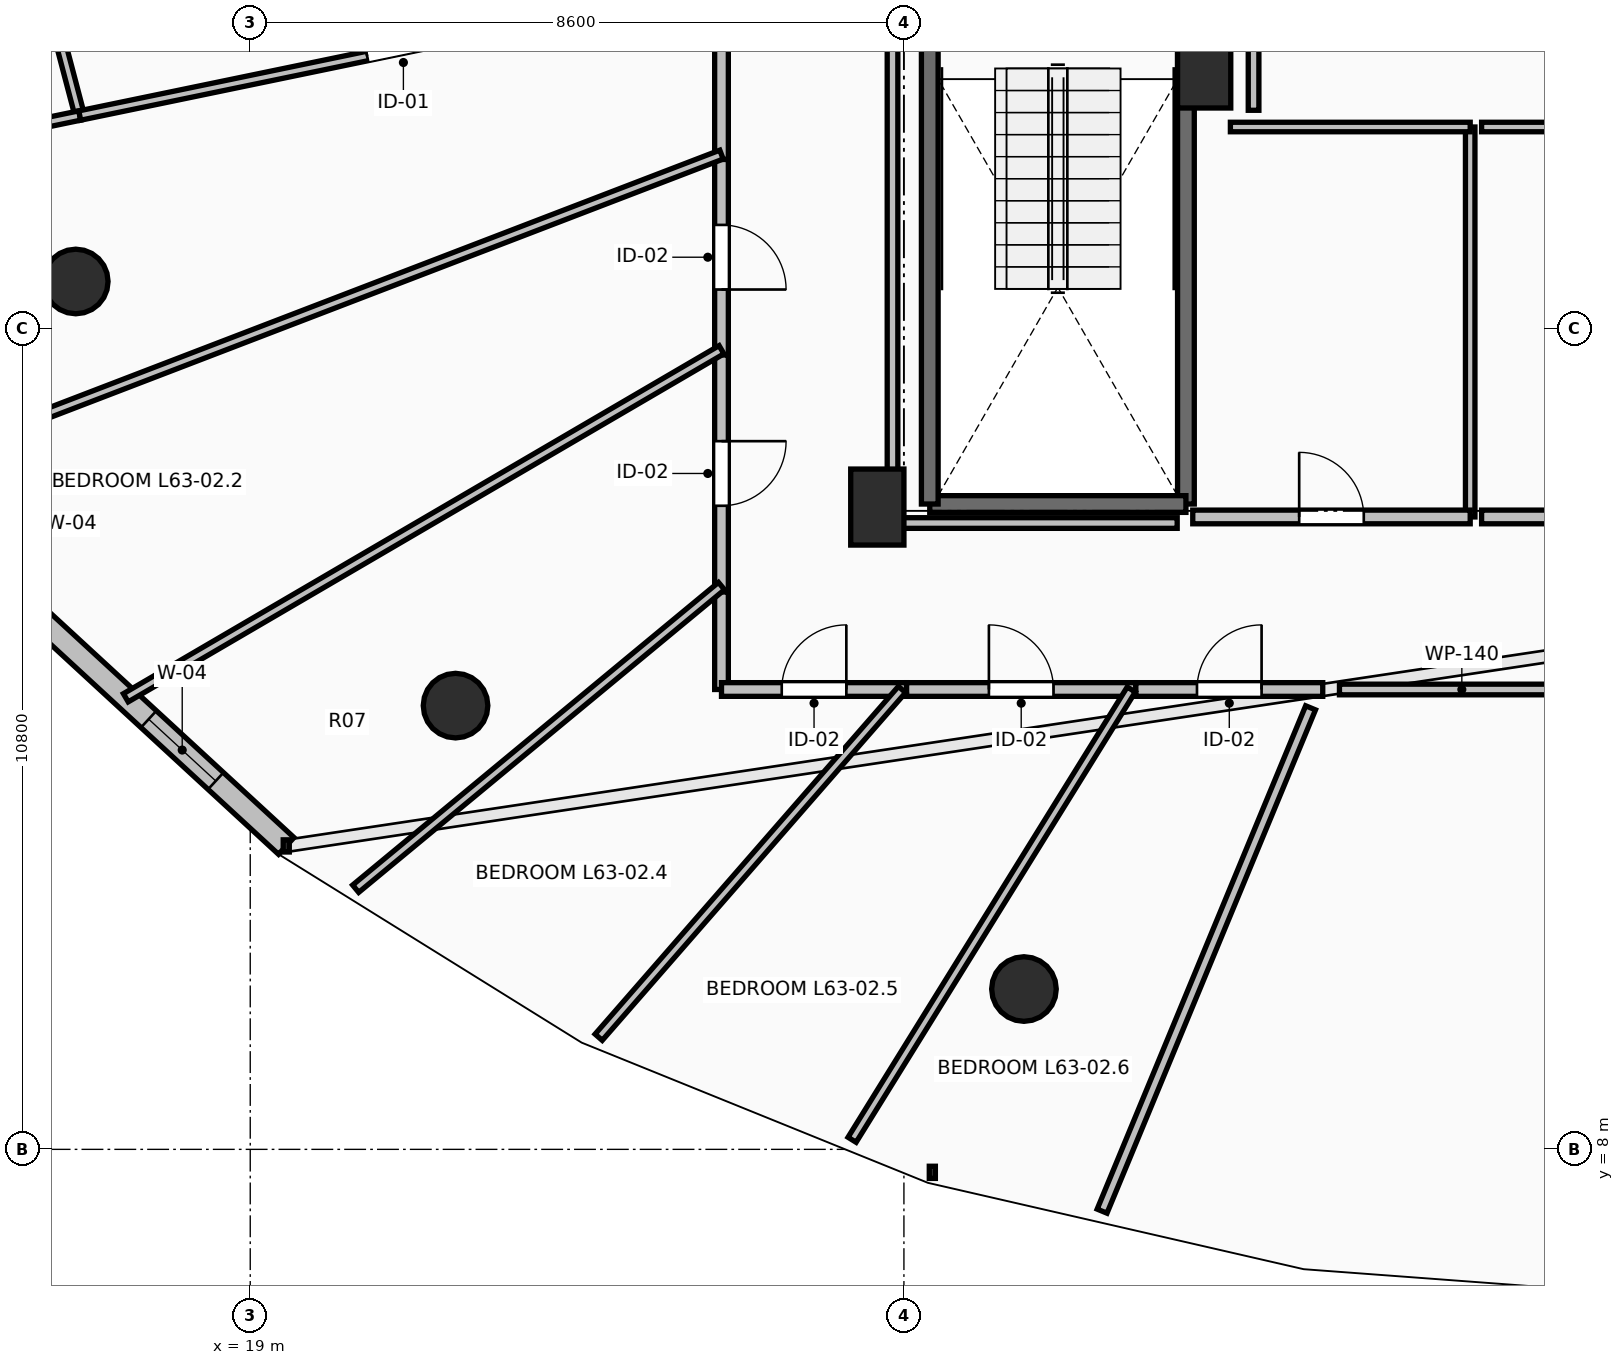
"""IFC4 building model, lengths in metres.
Left out: names, types, materials, properties, quantities, classifications, styles, units other than length and angle.
Written with IfcOpenShell. Run it as: python <this file> out.ifc"""

import sys

from ifc_helpers import new_model, si_unit, direction, frame, frame_2d, origin, origin_2d, place, context, subcontext, project, spatial, rectangle, circle, extrude, element, fill, save


model = new_model("IFC4")
c1 = context("Model", 3, precision=1e-05, world=origin(), true_north=direction((0.0, 1.0)))
c2 = subcontext(c1, "Body", "Model", "MODEL_VIEW")
j1 = project(units=[si_unit("LENGTHUNIT", "METRE"), si_unit("PLANEANGLEUNIT", "RADIAN")], contexts=[c1])
p1 = place(None, origin())
s1 = spatial("IfcSite", under=j1, at=p1, CompositionType="ELEMENT")
p2 = place(p1, origin())
s2 = spatial("IfcBuilding", under=s1, at=p2, CompositionType="ELEMENT")
p3 = place(p2, frame((0.0, 0.0, 234.25)))
s3 = spatial("IfcBuildingStorey", under=s2, at=p3, CompositionType="ELEMENT", Elevation=234.25)
for number, where, z_axis, x_axis in (
    (1, (16.705, 19.418, 0.0), (0.0, 0.0, 1.0), (-0.924, -0.383, 0.0)),
    (2, (21.701, 13.838, 0.0), (0.0, 0.0, 1.0), (-0.707, -0.707, 0.0)),
    (3, (29.179, 10.109, 0.0), (0.0, 0.0, 1.0), (-0.383, -0.924, 0.0)),
):
    element("IfcColumn", number, at=place(p3, frame(where, z_axis=z_axis, x_axis=x_axis)), inside=s3, PredefinedType="COLUMN", context=c2, shape_type="SweptSolid", body=[
        extrude(circle(Radius=0.425, at=origin_2d()), origin(), (0.0, 0.0, 1.0), 3.55),
    ])
for number, where, z_axis, x_axis in (
    (4, (27.25, 16.45, 0.0), (0.0, 0.0, 1.0), (1.0, 0.0, 0.0)),
    (5, (31.55, 22.2, 0.0), (0.0, 0.0, 1.0), (1.0, 0.0, 0.0)),
):
    element("IfcColumn", number, at=place(p3, frame(where, z_axis=z_axis, x_axis=x_axis)), inside=s3, PredefinedType="PILASTER", context=c2, shape_type="SweptSolid", body=[
        extrude(rectangle(XDim=0.7, YDim=1.0, at=origin_2d()), origin(), (0.0, 0.0, 1.0), 3.55),
    ])
p4 = place(p3, frame((16.216, 14.994, 0.0), z_axis=(0.0, 0.0, 1.0), x_axis=(0.735445373611, -0.677584018727, 0.0)))
e6 = element("IfcWall", 6, at=p4, inside=s3, PredefinedType="STANDARD", context=c2, shape_type="SweptSolid", body=[
    extrude(rectangle(XDim=4.43, YDim=0.3, at=frame_2d((2.215, 0.0))), origin(), (0.0, 0.0, 1.0), 3.29),
])
p5 = place(p4, frame((1.969, 0.0, 0.85)))
e7 = element("IfcOpeningElement", 7, at=p5, cuts=e6, PredefinedType="OPENING", context=c2, shape_type="SweptSolid", body=[
    extrude(rectangle(XDim=1.2, YDim=1.95, at=frame_2d((0.6, 0.975))), frame((0.0, 0.165, 0.0), z_axis=(0.0, -1.0, 0.0), x_axis=(1.0, 0.0, 0.0)), (0.0, 0.0, 1.0), 0.33),
])
p6 = place(p3, frame((31.31, 23.91, 0.0), z_axis=(0.0, 0.0, 1.0), x_axis=(0.0, -1.0, 0.0)))
e8 = element("IfcWall", 8, at=p6, inside=s3, PredefinedType="SOLIDWALL", context=c2, shape_type="SweptSolid", body=[
    extrude(rectangle(XDim=7.42, YDim=0.22, at=frame_2d((3.71, 0.0))), origin(), (0.0, 0.0, 1.0), 3.29),
])
p7 = place(p3, frame((31.31, 16.49, 0.0), z_axis=(0.0, 0.0, 1.0), x_axis=(-1.0, 0.0, 0.0)))
e9 = element("IfcWall", 9, at=p7, inside=s3, PredefinedType="SOLIDWALL", context=c2, shape_type="SweptSolid", body=[
    extrude(rectangle(XDim=3.37, YDim=0.22, at=frame_2d((1.685, 0.0))), origin(), (0.0, 0.0, 1.0), 3.29),
])
p8 = place(p3, frame((27.94, 16.49, 0.0), z_axis=(0.0, 0.0, 1.0), x_axis=(0.0, 1.0, 0.0)))
e10 = element("IfcWall", 10, at=p8, inside=s3, PredefinedType="SOLIDWALL", context=c2, shape_type="SweptSolid", body=[
    extrude(rectangle(XDim=7.42, YDim=0.22, at=frame_2d((3.71, 0.0))), origin(), (0.0, 0.0, 1.0), 3.29),
])
p9 = place(p3, frame((35.05, 16.32, 0.0), z_axis=(0.0, 0.0, 1.0), x_axis=(0.0, 1.0, 0.0)))
e11 = element("IfcWall", 11, at=p9, inside=s3, PredefinedType="PARTITIONING", context=c2, shape_type="SweptSolid", body=[
    extrude(rectangle(XDim=5.13, YDim=0.125, at=frame_2d((2.565, 0.0))), origin(), (0.0, 0.0, 1.0), 3.29),
])
p10 = place(p3, frame((35.05, 21.45, 0.0), z_axis=(0.0, 0.0, 1.0), x_axis=(-1.0, 0.0, 0.0)))
e12 = element("IfcWall", 12, at=p10, inside=s3, PredefinedType="PARTITIONING", context=c2, shape_type="SweptSolid", body=[
    extrude(rectangle(XDim=3.155, YDim=0.125, at=frame_2d((1.578, 0.0))), origin(), (0.0, 0.0, 1.0), 3.29),
])
p11 = place(p3, frame((31.4, 16.32, 0.0), z_axis=(0.0, 0.0, 1.0), x_axis=(1.0, 0.0, 0.0)))
e13 = element("IfcWall", 13, at=p11, inside=s3, PredefinedType="PARTITIONING", context=c2, shape_type="SweptSolid", body=[
    extrude(rectangle(XDim=3.65, YDim=0.18, at=frame_2d((1.825, 0.0))), origin(), (0.0, 0.0, 1.0), 3.29),
])
p12 = place(p11, frame((1.4, 0.0, 0.0)))
e14 = element("IfcOpeningElement", 14, at=p12, cuts=e13, PredefinedType="OPENING", context=c2, shape_type="SweptSolid", body=[
    extrude(rectangle(XDim=0.85, YDim=2.1, at=frame_2d((0.425, 1.05))), frame((0.0, 0.105, 0.0), z_axis=(0.0, -1.0, 0.0), x_axis=(1.0, 0.0, 0.0)), (0.0, 0.0, 1.0), 0.21),
])
p13 = place(p3, frame((38.8, 21.45, 0.0), z_axis=(0.0, 0.0, 1.0), x_axis=(-1.0, 0.0, 0.0)))
e15 = element("IfcWall", 15, at=p13, inside=s3, PredefinedType="PARTITIONING", context=c2, shape_type="SweptSolid", body=[
    extrude(rectangle(XDim=3.6, YDim=0.125, at=frame_2d((1.8, 0.0))), origin(), (0.0, 0.0, 1.0), 3.29),
])
p14 = place(p3, frame((35.2, 16.32, 0.0), z_axis=(0.0, 0.0, 1.0), x_axis=(1.0, 0.0, 0.0)))
e16 = element("IfcWall", 16, at=p14, inside=s3, PredefinedType="PARTITIONING", context=c2, shape_type="SweptSolid", body=[
    extrude(rectangle(XDim=3.6, YDim=0.18, at=frame_2d((1.8, 0.0))), origin(), (0.0, 0.0, 1.0), 3.29),
])
p15 = place(p14, frame((1.375, 0.0, 0.0)))
e17 = element("IfcOpeningElement", 17, at=p15, cuts=e16, PredefinedType="OPENING", context=c2, shape_type="SweptSolid", body=[
    extrude(rectangle(XDim=0.85, YDim=2.1, at=frame_2d((0.425, 1.05))), frame((0.0, 0.105, 0.0), z_axis=(0.0, -1.0, 0.0), x_axis=(1.0, 0.0, 0.0)), (0.0, 0.0, 1.0), 0.21),
])
p16 = place(p3, frame((25.2, 23.288, 0.0), z_axis=(0.0, 0.0, 1.0), x_axis=(0.0, -1.0, 0.0)))
e18 = element("IfcWall", 18, at=p16, inside=s3, PredefinedType="PARTITIONING", context=c2, shape_type="SweptSolid", body=[
    extrude(rectangle(XDim=2.265, YDim=0.18, at=frame_2d((1.133, 0.0))), origin(), (0.0, 0.0, 1.0), 3.29),
])
p17 = place(p3, frame((25.2, 21.023, 0.0), z_axis=(0.0, 0.0, 1.0), x_axis=(0.0, -1.0, 0.0)))
e19 = element("IfcWall", 19, at=p17, inside=s3, PredefinedType="PARTITIONING", context=c2, shape_type="SweptSolid", body=[
    extrude(rectangle(XDim=2.572, YDim=0.18, at=frame_2d((1.286, 0.0))), origin(), (0.0, 0.0, 1.0), 3.29),
])
p18 = place(p17, frame((0.861, 0.0, 0.0)))
e20 = element("IfcOpeningElement", 20, at=p18, cuts=e19, PredefinedType="OPENING", context=c2, shape_type="SweptSolid", body=[
    extrude(rectangle(XDim=0.85, YDim=2.1, at=frame_2d((0.425, 1.05))), frame((0.0, 0.105, 0.0), z_axis=(0.0, -1.0, 0.0), x_axis=(1.0, 0.0, 0.0)), (0.0, 0.0, 1.0), 0.21),
])
p19 = place(p3, frame((25.2, 18.451, 0.0), z_axis=(0.0, 0.0, 1.0), x_axis=(0.0, -1.0, 0.0)))
e21 = element("IfcWall", 21, at=p19, inside=s3, PredefinedType="PARTITIONING", context=c2, shape_type="SweptSolid", body=[
    extrude(rectangle(XDim=3.118, YDim=0.18, at=frame_2d((1.559, 0.0))), origin(), (0.0, 0.0, 1.0), 2.482),
])
p20 = place(p19, frame((1.134, 0.0, 0.0)))
e22 = element("IfcOpeningElement", 22, at=p20, cuts=e21, PredefinedType="OPENING", context=c2, shape_type="SweptSolid", body=[
    extrude(rectangle(XDim=0.85, YDim=2.1, at=frame_2d((0.425, 1.05))), frame((0.0, 0.105, 0.0), z_axis=(0.0, -1.0, 0.0), x_axis=(1.0, 0.0, 0.0)), (0.0, 0.0, 1.0), 0.21),
])
p21 = place(p3, frame((25.2, 15.333, 0.0), z_axis=(0.0, 0.0, 1.0), x_axis=(0.0, -1.0, 0.0)))
e23 = element("IfcWall", 23, at=p21, inside=s3, PredefinedType="PARTITIONING", context=c2, shape_type="SweptSolid", body=[
    extrude(rectangle(XDim=1.283, YDim=0.18, at=frame_2d((0.642, 0.0))), origin(), (0.0, 0.0, 1.0), 2.482),
])
p22 = place(p3, frame((25.2, 14.05, 0.0), z_axis=(0.0, 0.0, 1.0), x_axis=(1.0, 0.0, 0.0)))
e24 = element("IfcWall", 24, at=p22, inside=s3, PredefinedType="PARTITIONING", context=c2, shape_type="SweptSolid", body=[
    extrude(rectangle(XDim=2.435, YDim=0.18, at=frame_2d((1.218, 0.0))), origin(), (0.0, 0.0, 1.0), 2.924),
])
p23 = place(p22, frame((0.792, 0.0, 0.0)))
e25 = element("IfcOpeningElement", 25, at=p23, cuts=e24, PredefinedType="OPENING", context=c2, shape_type="SweptSolid", body=[
    extrude(rectangle(XDim=0.85, YDim=2.1, at=frame_2d((0.425, 1.05))), frame((0.0, 0.105, 0.0), z_axis=(0.0, -1.0, 0.0), x_axis=(1.0, 0.0, 0.0)), (0.0, 0.0, 1.0), 0.21),
])
p24 = place(p3, frame((27.635, 14.05, 0.0), z_axis=(0.0, 0.0, 1.0), x_axis=(1.0, 0.0, 0.0)))
e26 = element("IfcWall", 26, at=p24, inside=s3, PredefinedType="PARTITIONING", context=c2, shape_type="SweptSolid", body=[
    extrude(rectangle(XDim=3.016, YDim=0.18, at=frame_2d((1.508, 0.0))), origin(), (0.0, 0.0, 1.0), 2.482),
])
p25 = place(p24, frame((1.083, 0.0, 0.0)))
e27 = element("IfcOpeningElement", 27, at=p25, cuts=e26, PredefinedType="OPENING", context=c2, shape_type="SweptSolid", body=[
    extrude(rectangle(XDim=0.85, YDim=2.1, at=frame_2d((0.425, 1.05))), frame((0.0, 0.105, 0.0), z_axis=(0.0, -1.0, 0.0), x_axis=(1.0, 0.0, 0.0)), (0.0, 0.0, 1.0), 0.21),
])
p26 = place(p3, frame((30.651, 14.05, 0.0), z_axis=(0.0, 0.0, 1.0), x_axis=(1.0, 0.0, 0.0)))
e28 = element("IfcWall", 28, at=p26, inside=s3, PredefinedType="PARTITIONING", context=c2, shape_type="SweptSolid", body=[
    extrude(rectangle(XDim=2.459, YDim=0.18, at=frame_2d((1.229, 0.0))), origin(), (0.0, 0.0, 1.0), 2.972),
])
p27 = place(p26, frame((0.804, 0.0, 0.0)))
e29 = element("IfcOpeningElement", 29, at=p27, cuts=e28, PredefinedType="OPENING", context=c2, shape_type="SweptSolid", body=[
    extrude(rectangle(XDim=0.85, YDim=2.1, at=frame_2d((0.425, 1.05))), frame((0.0, 0.105, 0.0), z_axis=(0.0, -1.0, 0.0), x_axis=(1.0, 0.0, 0.0)), (0.0, 0.0, 1.0), 0.21),
])
p28 = place(p3, frame((15.6, 26.0, 0.0), z_axis=(0.0, 0.0, 1.0), x_axis=(0.25436383836, -0.967108596661, 0.0)))
e30 = element("IfcWall", 30, at=p28, inside=s3, PredefinedType="PARTITIONING", context=c2, shape_type="SweptSolid", body=[
    extrude(rectangle(XDim=4.549, YDim=0.125, at=frame_2d((2.274, 0.0))), origin(), (0.0, 0.0, 1.0), 2.482),
])
p29 = place(p28, frame((1.824, 0.0, 0.0)))
e31 = element("IfcOpeningElement", 31, at=p29, cuts=e30, PredefinedType="OPENING", context=c2, shape_type="SweptSolid", body=[
    extrude(rectangle(XDim=0.9, YDim=2.1, at=frame_2d((0.45, 1.05))), frame((0.0, 0.077, 0.0), z_axis=(0.0, -1.0, 0.0), x_axis=(1.0, 0.0, 0.0)), (0.0, 0.0, 1.0), 0.155),
])
p30 = place(p3, frame((16.757, 21.601, 0.0), z_axis=(0.0, 0.0, 1.0), x_axis=(-0.979193678003, -0.2029279206, 0.0)))
e32 = element("IfcWall", 32, at=p30, inside=s3, PredefinedType="PARTITIONING", context=c2, shape_type="SweptSolid", body=[
    extrude(rectangle(XDim=2.479, YDim=0.125, at=frame_2d((1.24, 0.0))), origin(), (0.0, 0.0, 1.0), 2.874),
])
p31 = place(p3, frame((16.757, 21.601, 0.0), z_axis=(0.0, 0.0, 1.0), x_axis=(0.979226116247, 0.20277133244, 0.0)))
e33 = element("IfcWall", 33, at=p31, inside=s3, PredefinedType="PARTITIONING", context=c2, shape_type="SweptSolid", body=[
    extrude(rectangle(XDim=8.622, YDim=0.125, at=frame_2d((4.311, 0.0))), origin(), (0.0, 0.0, 1.0), 2.924),
])
p32 = place(p31, frame((3.861, 0.0, 0.0)))
e34 = element("IfcOpeningElement", 34, at=p32, cuts=e33, PredefinedType="OPENING", context=c2, shape_type="SweptSolid", body=[
    extrude(rectangle(XDim=0.9, YDim=2.1, at=frame_2d((0.45, 1.05))), frame((0.0, 0.077, 0.0), z_axis=(0.0, -1.0, 0.0), x_axis=(1.0, 0.0, 0.0)), (0.0, 0.0, 1.0), 0.155),
])
p33 = place(p3, frame((14.748, 17.074, 0.0), z_axis=(0.0, 0.0, 1.0), x_axis=(0.93355564233, 0.358432507836, 0.0)))
e35 = element("IfcWall", 35, at=p33, inside=s3, PredefinedType="PARTITIONING", context=c2, shape_type="SweptSolid", body=[
    extrude(rectangle(XDim=11.196, YDim=0.125, at=frame_2d((5.598, 0.0))), origin(), (0.0, 0.0, 1.0), 2.482),
])
p34 = place(p3, frame((17.363, 13.941, 0.0), z_axis=(0.0, 0.0, 1.0), x_axis=(0.863415767124, 0.5044930258, 0.0)))
e36 = element("IfcWall", 36, at=p34, inside=s3, PredefinedType="PARTITIONING", context=c2, shape_type="SweptSolid", body=[
    extrude(rectangle(XDim=9.077, YDim=0.125, at=frame_2d((4.538, 0.0))), origin(), (0.0, 0.0, 1.0), 2.482),
])
p35 = place(p3, frame((20.387, 11.429, 0.0), z_axis=(0.0, 0.0, 1.0), x_axis=(0.770490958976, 0.637450925277, 0.0)))
e37 = element("IfcWall", 37, at=p35, inside=s3, PredefinedType="PARTITIONING", context=c2, shape_type="SweptSolid", body=[
    extrude(rectangle(XDim=6.247, YDim=0.125, at=frame_2d((3.123, 0.0))), origin(), (0.0, 0.0, 1.0), 2.482),
])
p36 = place(p3, frame((23.584, 9.475, 0.0), z_axis=(0.0, 0.0, 1.0), x_axis=(0.657373610703, 0.75356481868, 0.0)))
e38 = element("IfcWall", 38, at=p36, inside=s3, PredefinedType="PARTITIONING", context=c2, shape_type="SweptSolid", body=[
    extrude(rectangle(XDim=6.071, YDim=0.125, at=frame_2d((3.036, 0.0))), origin(), (0.0, 0.0, 1.0), 2.874),
])
p37 = place(p3, frame((26.918, 8.126, 0.0), z_axis=(0.0, 0.0, 1.0), x_axis=(0.526957378796, 0.849891711298, 0.0)))
e39 = element("IfcWall", 39, at=p37, inside=s3, PredefinedType="PARTITIONING", context=c2, shape_type="SweptSolid", body=[
    extrude(rectangle(XDim=6.97, YDim=0.125, at=frame_2d((3.485, 0.0))), origin(), (0.0, 0.0, 1.0), 2.482),
])
p38 = place(p3, frame((32.2, 24.13, 0.0), z_axis=(0.0, 0.0, 1.0), x_axis=(0.0, -1.0, 0.0)))
e40 = element("IfcWall", 40, at=p38, inside=s3, PredefinedType="PARTITIONING", context=c2, shape_type="SweptSolid", body=[
    extrude(rectangle(XDim=2.46, YDim=0.14, at=frame_2d((1.23, 0.0))), origin(), (0.0, 0.0, 1.0), 2.482),
])
p39 = place(p3, frame((33.33, 14.05, 0.0), z_axis=(0.0, 0.0, 1.0), x_axis=(1.0, 0.0, 0.0)))
e41 = element("IfcWall", 41, at=p39, inside=s3, PredefinedType="PARTITIONING", context=c2, shape_type="SweptSolid", body=[
    extrude(rectangle(XDim=3.22, YDim=0.14, at=frame_2d((1.61, 0.0))), origin(), (0.0, 0.0, 1.0), 2.972),
])
p40 = place(p3, frame((27.45, 23.754, 0.0), z_axis=(0.0, 0.0, 1.0), x_axis=(0.0, -1.0, 0.0)))
e42 = element("IfcWall", 42, at=p40, inside=s3, PredefinedType="PARTITIONING", context=c2, shape_type="SweptSolid", body=[
    extrude(rectangle(XDim=7.514, YDim=0.14, at=frame_2d((3.757, 0.0))), origin(), (0.0, 0.0, 1.0), 2.482),
])
p41 = place(p3, frame((27.45, 16.24, 0.0), z_axis=(0.0, 0.0, 1.0), x_axis=(1.0, 0.0, 0.0)))
e43 = element("IfcWall", 43, at=p41, inside=s3, PredefinedType="PARTITIONING", context=c2, shape_type="SweptSolid", body=[
    extrude(rectangle(XDim=3.745, YDim=0.14, at=frame_2d((1.873, 0.0))), origin(), (0.0, 0.0, 1.0), 2.482),
])
p42 = place(p3, frame((30.207, 7.187, 0.0), z_axis=(0.0, 0.0, 1.0), x_axis=(0.382679691634, 0.923881081964, 0.0)))
e44 = element("IfcWall", 44, at=p42, inside=s3, PredefinedType="PARTITIONING", context=c2, shape_type="SweptSolid", body=[
    extrude(rectangle(XDim=7.168, YDim=0.14, at=frame_2d((3.584, 0.0))), origin(), (0.0, 0.0, 1.0), 2.874),
])
p43 = place(p5, origin())
e45 = element("IfcWindow", 45, at=p43, inside=s3, PartitioningType="SINGLE_PANEL", PredefinedType="WINDOW", context=c2, shape_type="SweptSolid", body=[
    extrude(rectangle(XDim=1.2, YDim=1.95, at=frame_2d((0.6, 0.975))), frame((0.0, 0.03, 0.0), z_axis=(0.0, -1.0, 0.0), x_axis=(1.0, 0.0, 0.0)), (0.0, 0.0, 1.0), 0.06),
])
fill(e7, e45)
p44 = place(p12, origin())
e46 = element("IfcDoor", 46, at=p44, inside=s3, OperationType="SINGLE_SWING_LEFT", PredefinedType="DOOR", context=c2, shape_type="SweptSolid", body=[
    extrude(rectangle(XDim=0.85, YDim=2.1, at=frame_2d((0.425, 1.05))), frame((0.0, 0.025, 0.0), z_axis=(0.0, -1.0, 0.0), x_axis=(1.0, 0.0, 0.0)), (0.0, 0.0, 1.0), 0.05),
])
fill(e14, e46)
p45 = place(p32, origin())
e47 = element("IfcDoor", 47, at=p45, inside=s3, OperationType="SINGLE_SWING_LEFT", PredefinedType="DOOR", context=c2, shape_type="SweptSolid", body=[
    extrude(rectangle(XDim=0.9, YDim=2.1, at=frame_2d((0.45, 1.05))), frame((0.0, 0.025, 0.0), z_axis=(0.0, -1.0, 0.0), x_axis=(1.0, 0.0, 0.0)), (0.0, 0.0, 1.0), 0.05),
])
fill(e34, e47)
p46 = place(p18, origin())
e48 = element("IfcDoor", 48, at=p46, inside=s3, OperationType="SINGLE_SWING_RIGHT", PredefinedType="DOOR", context=c2, shape_type="SweptSolid", body=[
    extrude(rectangle(XDim=0.85, YDim=2.1, at=frame_2d((0.425, 1.05))), frame((0.0, 0.025, 0.0), z_axis=(0.0, -1.0, 0.0), x_axis=(1.0, 0.0, 0.0)), (0.0, 0.0, 1.0), 0.05),
])
fill(e20, e48)
p47 = place(p20, origin())
e49 = element("IfcDoor", 49, at=p47, inside=s3, OperationType="SINGLE_SWING_LEFT", PredefinedType="DOOR", context=c2, shape_type="SweptSolid", body=[
    extrude(rectangle(XDim=0.85, YDim=2.1, at=frame_2d((0.425, 1.05))), frame((0.0, 0.025, 0.0), z_axis=(0.0, -1.0, 0.0), x_axis=(1.0, 0.0, 0.0)), (0.0, 0.0, 1.0), 0.05),
])
fill(e22, e49)
p48 = place(p23, origin())
e50 = element("IfcDoor", 50, at=p48, inside=s3, OperationType="SINGLE_SWING_RIGHT", PredefinedType="DOOR", context=c2, shape_type="SweptSolid", body=[
    extrude(rectangle(XDim=0.85, YDim=2.1, at=frame_2d((0.425, 1.05))), frame((0.0, 0.025, 0.0), z_axis=(0.0, -1.0, 0.0), x_axis=(1.0, 0.0, 0.0)), (0.0, 0.0, 1.0), 0.05),
])
fill(e25, e50)
p49 = place(p25, origin())
e51 = element("IfcDoor", 51, at=p49, inside=s3, OperationType="SINGLE_SWING_LEFT", PredefinedType="DOOR", context=c2, shape_type="SweptSolid", body=[
    extrude(rectangle(XDim=0.85, YDim=2.1, at=frame_2d((0.425, 1.05))), frame((0.0, 0.025, 0.0), z_axis=(0.0, -1.0, 0.0), x_axis=(1.0, 0.0, 0.0)), (0.0, 0.0, 1.0), 0.05),
])
fill(e27, e51)
p50 = place(p27, origin())
e52 = element("IfcDoor", 52, at=p50, inside=s3, OperationType="SINGLE_SWING_RIGHT", PredefinedType="DOOR", context=c2, shape_type="SweptSolid", body=[
    extrude(rectangle(XDim=0.85, YDim=2.1, at=frame_2d((0.425, 1.05))), frame((0.0, 0.025, 0.0), z_axis=(0.0, -1.0, 0.0), x_axis=(1.0, 0.0, 0.0)), (0.0, 0.0, 1.0), 0.05),
])
fill(e29, e52)
save(model, sys.argv[1])
